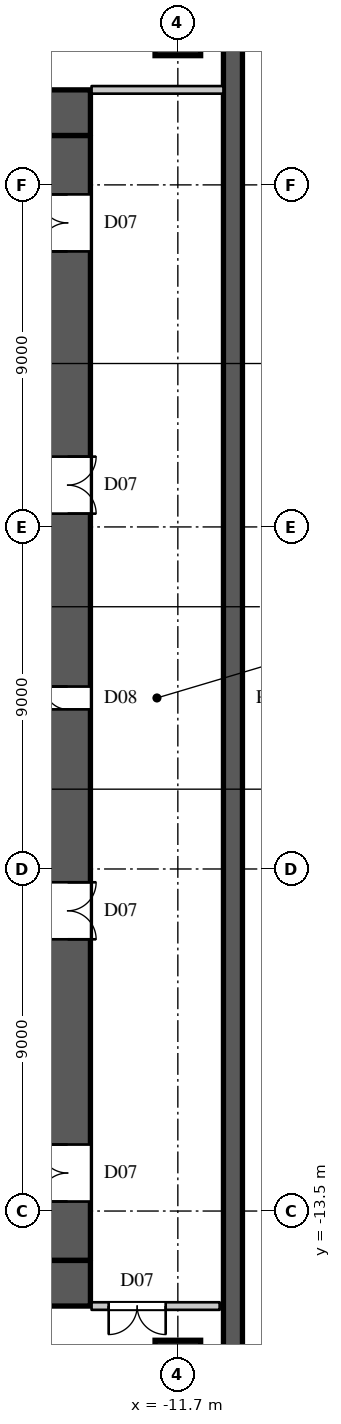
"""IFC4 building model, lengths in metres.
Left out: names, types, materials, properties, quantities, classifications, styles, units other than length and angle.
Written with IfcOpenShell. Run it as: python <this file> out.ifc"""

import sys

from ifc_helpers import new_model, si_unit, direction, frame, frame_2d, origin, origin_2d, place, context, subcontext, project, spatial, rectangle, circle, extrude, element, fill, save


model = new_model("IFC4")
c1 = context("Model", 3, precision=1e-05, world=origin(), true_north=direction((0.0, 1.0)))
c2 = subcontext(c1, "Body", "Model", "MODEL_VIEW")
j1 = project(units=[si_unit("LENGTHUNIT", "METRE"), si_unit("PLANEANGLEUNIT", "RADIAN")], contexts=[c1])
p1 = place(None, origin())
s1 = spatial("IfcSite", under=j1, at=p1, CompositionType="ELEMENT")
p2 = place(p1, origin())
s2 = spatial("IfcBuilding", under=s1, at=p2, CompositionType="ELEMENT")
p3 = place(p2, frame((0.0, 0.0, 19.0)))
s3 = spatial("IfcBuildingStorey", under=s2, at=p3, CompositionType="ELEMENT", Elevation=19.0)
p4 = place(p3, frame((-10.25, -19.5, 0.0), z_axis=(0.0, 0.0, 1.0), x_axis=(0.0, 1.0, 0.0)))
e1 = element("IfcWall", 1, at=p4, inside=s3, PredefinedType="SOLIDWALL", context=c2, shape_type="SweptSolid", body=[
    extrude(rectangle(XDim=39.0, YDim=0.5, at=frame_2d((19.5, 0.0))), origin(), (0.0, 0.0, 1.0), 10.0),
])
for number, where, z_axis, x_axis in (
    (2, (-11.7, -17.5, 0.0), (0.0, 0.0, 1.0), (1.0, 0.0, 0.0)),
    (3, (-11.7, 17.5, 0.0), (0.0, 0.0, 1.0), (1.0, 0.0, 0.0)),
):
    element("IfcColumn", number, at=place(p3, frame(where, z_axis=z_axis, x_axis=x_axis)), inside=s3, PredefinedType="COLUMN", context=c2, shape_type="SweptSolid", body=[
        extrude(circle(Radius=0.6, at=origin_2d()), origin(), (0.0, 0.0, 1.0), 10.0),
    ])
for number, where, z_axis, x_axis in (
    (4, (-30.0, 15.4, 0.0), (0.0, 0.0, 1.0), (1.0, 0.0, 0.0)),
    (5, (-30.0, -15.4, 0.0), (0.0, 0.0, 1.0), (1.0, 0.0, 0.0)),
):
    element("IfcWall", number, at=place(p3, frame(where, z_axis=z_axis, x_axis=x_axis)), inside=s3, PredefinedType="SHEAR", context=c2, shape_type="SweptSolid", body=[
        extrude(rectangle(XDim=16.0, YDim=1.2, at=frame_2d((8.0, 0.0))), origin(), (0.0, 0.0, 1.0), 10.0),
    ])
p5 = place(p3, frame((-14.6, -14.8, 0.0), z_axis=(0.0, 0.0, 1.0), x_axis=(0.0, 1.0, 0.0)))
e6 = element("IfcWall", 6, at=p5, inside=s3, PredefinedType="SHEAR", context=c2, shape_type="SweptSolid", body=[
    extrude(rectangle(XDim=29.6, YDim=1.2, at=frame_2d((14.8, 0.0))), origin(), (0.0, 0.0, 1.0), 10.0),
])
p6 = place(p5, frame((1.55, 0.0, 0.0)))
e7 = element("IfcOpeningElement", 7, at=p6, cuts=e6, PredefinedType="OPENING", context=c2, shape_type="SweptSolid", body=[
    extrude(rectangle(XDim=1.5, YDim=2.4, at=frame_2d((0.75, 1.2))), frame((0.0, 0.61, 0.0), z_axis=(0.0, -1.0, 0.0), x_axis=(1.0, 0.0, 0.0)), (0.0, 0.0, 1.0), 1.22),
])
p7 = place(p5, frame((26.55, 0.0, 0.0)))
e8 = element("IfcOpeningElement", 8, at=p7, cuts=e6, PredefinedType="OPENING", context=c2, shape_type="SweptSolid", body=[
    extrude(rectangle(XDim=1.5, YDim=2.4, at=frame_2d((0.75, 1.2))), frame((0.0, 0.61, 0.0), z_axis=(0.0, -1.0, 0.0), x_axis=(1.0, 0.0, 0.0)), (0.0, 0.0, 1.0), 1.22),
])
p8 = place(p5, frame((8.45, 0.0, 0.0)))
e9 = element("IfcOpeningElement", 9, at=p8, cuts=e6, PredefinedType="OPENING", context=c2, shape_type="SweptSolid", body=[
    extrude(rectangle(XDim=1.5, YDim=2.4, at=frame_2d((0.75, 1.2))), frame((0.0, 0.61, 0.0), z_axis=(0.0, -1.0, 0.0), x_axis=(1.0, 0.0, 0.0)), (0.0, 0.0, 1.0), 1.22),
])
p9 = place(p5, frame((19.65, 0.0, 0.0)))
e10 = element("IfcOpeningElement", 10, at=p9, cuts=e6, PredefinedType="OPENING", context=c2, shape_type="SweptSolid", body=[
    extrude(rectangle(XDim=1.5, YDim=2.4, at=frame_2d((0.75, 1.2))), frame((0.0, 0.61, 0.0), z_axis=(0.0, -1.0, 0.0), x_axis=(1.0, 0.0, 0.0)), (0.0, 0.0, 1.0), 1.22),
])
p10 = place(p5, frame((14.5, 0.0, 0.0)))
e11 = element("IfcOpeningElement", 11, at=p10, cuts=e6, PredefinedType="OPENING", context=c2, shape_type="SweptSolid", body=[
    extrude(rectangle(XDim=0.6, YDim=2.0, at=frame_2d((0.3, 1.0))), frame((0.0, 0.61, 0.0), z_axis=(0.0, -1.0, 0.0), x_axis=(1.0, 0.0, 0.0)), (0.0, 0.0, 1.0), 1.22),
])
p11 = place(p3, frame((-13.97, -16.0, 0.0), z_axis=(0.0, 0.0, 1.0), x_axis=(1.0, 0.0, 0.0)))
e12 = element("IfcWall", 12, at=p11, inside=s3, PredefinedType="PARTITIONING", context=c2, shape_type="SweptSolid", body=[
    extrude(rectangle(XDim=3.37, YDim=0.2, at=frame_2d((1.685, 0.0))), origin(), (0.0, 0.0, 1.0), 9.598),
])
p12 = place(p11, frame((0.45, 0.0, 0.0)))
e13 = element("IfcOpeningElement", 13, at=p12, cuts=e12, PredefinedType="OPENING", context=c2, shape_type="SweptSolid", body=[
    extrude(rectangle(XDim=1.5, YDim=2.4, at=frame_2d((0.75, 1.2))), frame((0.0, 0.11, 0.0), z_axis=(0.0, -1.0, 0.0), x_axis=(1.0, 0.0, 0.0)), (0.0, 0.0, 1.0), 0.22),
])
p13 = place(p3, frame((-13.97, 16.0, 0.0), z_axis=(0.0, 0.0, 1.0), x_axis=(1.0, 0.0, 0.0)))
e14 = element("IfcWall", 14, at=p13, inside=s3, PredefinedType="PARTITIONING", context=c2, shape_type="SweptSolid", body=[
    extrude(rectangle(XDim=3.47, YDim=0.2, at=frame_2d((1.735, 0.0))), origin(), (0.0, 0.0, 1.0), 9.598),
])
p14 = place(p12, origin())
e15 = element("IfcDoor", 15, at=p14, inside=s3, OperationType="DOUBLE_DOOR_SINGLE_SWING", PredefinedType="DOOR", context=c2, shape_type="SweptSolid", body=[
    extrude(rectangle(XDim=1.5, YDim=2.4, at=frame_2d((0.75, 1.2))), frame((0.0, 0.025, 0.0), z_axis=(0.0, -1.0, 0.0), x_axis=(1.0, 0.0, 0.0)), (0.0, 0.0, 1.0), 0.05),
])
fill(e13, e15)
p15 = place(p6, origin())
e16 = element("IfcDoor", 16, at=p15, inside=s3, OperationType="DOUBLE_DOOR_SINGLE_SWING", PredefinedType="DOOR", context=c2, shape_type="SweptSolid", body=[
    extrude(rectangle(XDim=1.5, YDim=2.4, at=frame_2d((0.75, 1.2))), frame((0.0, 0.025, 0.0), z_axis=(0.0, -1.0, 0.0), x_axis=(1.0, 0.0, 0.0)), (0.0, 0.0, 1.0), 0.05),
])
fill(e7, e16)
p16 = place(p7, origin())
e17 = element("IfcDoor", 17, at=p16, inside=s3, OperationType="DOUBLE_DOOR_SINGLE_SWING", PredefinedType="DOOR", context=c2, shape_type="SweptSolid", body=[
    extrude(rectangle(XDim=1.5, YDim=2.4, at=frame_2d((0.75, 1.2))), frame((0.0, 0.025, 0.0), z_axis=(0.0, -1.0, 0.0), x_axis=(1.0, 0.0, 0.0)), (0.0, 0.0, 1.0), 0.05),
])
fill(e8, e17)
p17 = place(p8, origin())
e18 = element("IfcDoor", 18, at=p17, inside=s3, OperationType="DOUBLE_DOOR_SINGLE_SWING", PredefinedType="DOOR", context=c2, shape_type="SweptSolid", body=[
    extrude(rectangle(XDim=1.5, YDim=2.4, at=frame_2d((0.75, 1.2))), frame((0.0, 0.025, 0.0), z_axis=(0.0, -1.0, 0.0), x_axis=(1.0, 0.0, 0.0)), (0.0, 0.0, 1.0), 0.05),
])
fill(e9, e18)
p18 = place(p9, origin())
e19 = element("IfcDoor", 19, at=p18, inside=s3, OperationType="DOUBLE_DOOR_SINGLE_SWING", PredefinedType="DOOR", context=c2, shape_type="SweptSolid", body=[
    extrude(rectangle(XDim=1.5, YDim=2.4, at=frame_2d((0.75, 1.2))), frame((0.0, 0.025, 0.0), z_axis=(0.0, -1.0, 0.0), x_axis=(1.0, 0.0, 0.0)), (0.0, 0.0, 1.0), 0.05),
])
fill(e10, e19)
p19 = place(p10, origin())
e20 = element("IfcDoor", 20, at=p19, inside=s3, OperationType="SINGLE_SWING_RIGHT", PredefinedType="DOOR", context=c2, shape_type="SweptSolid", body=[
    extrude(rectangle(XDim=0.6, YDim=2.0, at=frame_2d((0.3, 1.0))), frame((0.0, 0.025, 0.0), z_axis=(0.0, -1.0, 0.0), x_axis=(1.0, 0.0, 0.0)), (0.0, 0.0, 1.0), 0.05),
])
fill(e11, e20)
save(model, sys.argv[1])
